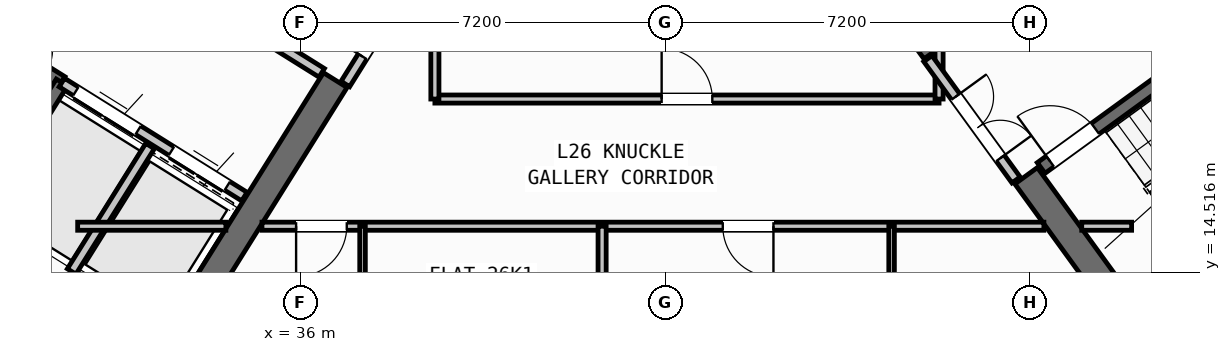
"""IFC4 building model, lengths in metres.
Left out: names, types, materials, properties, quantities, classifications, styles, units other than length and angle.
Written with IfcOpenShell. Run it as: python <this file> out.ifc"""

import sys

from ifc_helpers import new_model, si_unit, direction, frame, frame_2d, origin, place, context, subcontext, project, spatial, rectangle, extrude, source, transform, mapped, element, fill, save


model = new_model("IFC4")
c1 = context("Model", 3, precision=1e-05, world=origin(), true_north=direction((0.0, 1.0)))
c2 = subcontext(c1, "Body", "Model", "MODEL_VIEW")
j1 = project(units=[si_unit("LENGTHUNIT", "METRE"), si_unit("PLANEANGLEUNIT", "RADIAN")], contexts=[c1])
p1 = place(None, origin())
s1 = spatial("IfcSite", under=j1, at=p1, CompositionType="ELEMENT")
p2 = place(p1, origin())
s2 = spatial("IfcBuilding", under=s1, at=p2, CompositionType="ELEMENT")
p3 = place(p2, frame((0.0, 0.0, 105.3)))
s3 = spatial("IfcBuildingStorey", under=s2, at=p3, CompositionType="ELEMENT", Elevation=105.3)
p4 = place(p3, frame((33.366, 12.477, 0.0), z_axis=(0.0, 0.0, 1.0), x_axis=(-0.848047359947, 0.529920442413, 0.0)))
e1 = element("IfcWall", 1, at=p4, inside=s3, PredefinedType="SHEAR", context=c2, shape_type="SweptSolid", body=[
    extrude(rectangle(XDim=13.14, YDim=0.55, at=frame_2d((6.57, 0.0))), origin(), (0.0, 0.0, 1.0), 3.35),
])
p5 = place(p3, frame((36.683, 18.304, 0.0), z_axis=(0.0, 0.0, 1.0), x_axis=(-0.529896466841, -0.848062341122, 0.0)))
e2 = element("IfcWall", 2, at=p5, inside=s3, PredefinedType="SHEAR", context=c2, shape_type="SweptSolid", body=[
    extrude(rectangle(XDim=6.425, YDim=0.55, at=frame_2d((3.212, 0.0))), origin(), (0.0, 0.0, 1.0), 3.35),
])
p6 = place(p3, frame((52.359, 13.14, 0.0), z_axis=(0.0, 0.0, 1.0), x_axis=(0.809014896919, 0.587788139183, 0.0)))
e3 = element("IfcWall", 3, at=p6, inside=s3, PredefinedType="SHEAR", context=c2, shape_type="SweptSolid", body=[
    extrude(rectangle(XDim=12.34, YDim=0.55, at=frame_2d((6.17, 0.0))), origin(), (0.0, 0.0, 1.0), 3.35),
])
p7 = place(p3, frame((52.42, 13.524, 0.0), z_axis=(0.0, 0.0, 1.0), x_axis=(-0.587802113096, 0.809004744015, 0.0)))
e4 = element("IfcWall", 4, at=p7, inside=s3, PredefinedType="SHEAR", context=c2, shape_type="SweptSolid", body=[
    extrude(rectangle(XDim=3.575, YDim=0.55, at=frame_2d((1.788, 0.0))), origin(), (0.0, 0.0, 1.0), 3.35),
])
p8 = place(p3, frame((48.526, 18.884, 0.0), z_axis=(0.0, 0.0, 1.0), x_axis=(-0.587764933797, 0.809031756236, 0.0)))
e5 = element("IfcWall", 5, at=p8, inside=s3, PredefinedType="SHEAR", context=c2, shape_type="SweptSolid", body=[
    extrude(rectangle(XDim=6.425, YDim=0.55, at=frame_2d((3.212, 0.0))), origin(), (0.0, 0.0, 1.0), 3.35),
])
p9 = place(p3, frame((31.76, 12.183, 0.0), z_axis=(0.0, 0.0, 1.0), x_axis=(-0.848047074256, 0.529920899612, 0.0)))
e6 = element("IfcWall", 6, at=p9, inside=s3, PredefinedType="STANDARD", context=c2, shape_type="SweptSolid", body=[
    extrude(rectangle(XDim=30.652, YDim=0.32, at=frame_2d((15.326, 0.0))), origin(), (0.0, 0.0, 1.0), 3.35),
])
p10 = place(p9, frame((15.153, 0.0, 0.0)))
e7 = element("IfcOpeningElement", 7, at=p10, cuts=e6, PredefinedType="OPENING", context=c2, shape_type="SweptSolid", body=[
    extrude(rectangle(XDim=1.2, YDim=2.15, at=frame_2d((0.6, 1.075))), frame((0.0, 0.17, 0.0), z_axis=(0.0, -1.0, 0.0), x_axis=(1.0, 0.0, 0.0)), (0.0, 0.0, 1.0), 0.34),
])
p11 = place(p9, frame((2.002, 0.0, 0.8)))
e8 = element("IfcOpeningElement", 8, at=p11, cuts=e6, PredefinedType="OPENING", context=c2, shape_type="SweptSolid", body=[
    extrude(rectangle(XDim=2.1, YDim=1.55, at=frame_2d((1.05, 0.775))), frame((0.0, 0.17, 0.0), z_axis=(0.0, -1.0, 0.0), x_axis=(1.0, 0.0, 0.0)), (0.0, 0.0, 1.0), 0.34),
])
p12 = place(p9, frame((7.206, 0.0, 0.8)))
e9 = element("IfcOpeningElement", 9, at=p12, cuts=e6, PredefinedType="OPENING", context=c2, shape_type="SweptSolid", body=[
    extrude(rectangle(XDim=2.1, YDim=1.55, at=frame_2d((1.05, 0.775))), frame((0.0, 0.17, 0.0), z_axis=(0.0, -1.0, 0.0), x_axis=(1.0, 0.0, 0.0)), (0.0, 0.0, 1.0), 0.34),
])
p13 = place(p9, frame((12.648, 0.0, 1.0)))
e10 = element("IfcOpeningElement", 10, at=p13, cuts=e6, PredefinedType="OPENING", context=c2, shape_type="SweptSolid", body=[
    extrude(rectangle(XDim=0.9, YDim=1.25, at=frame_2d((0.45, 0.625))), frame((0.0, 0.17, 0.0), z_axis=(0.0, -1.0, 0.0), x_axis=(1.0, 0.0, 0.0)), (0.0, 0.0, 1.0), 0.34),
])
p14 = place(p9, frame((20.628, 0.0, 0.95)))
e11 = element("IfcOpeningElement", 11, at=p14, cuts=e6, PredefinedType="OPENING", context=c2, shape_type="SweptSolid", body=[
    extrude(rectangle(XDim=1.2, YDim=1.4, at=frame_2d((0.6, 0.7))), frame((0.0, 0.17, 0.0), z_axis=(0.0, -1.0, 0.0), x_axis=(1.0, 0.0, 0.0)), (0.0, 0.0, 1.0), 0.34),
])
p15 = place(p9, frame((26.008, 0.0, 1.0)))
e12 = element("IfcOpeningElement", 12, at=p15, cuts=e6, PredefinedType="OPENING", context=c2, shape_type="SweptSolid", body=[
    extrude(rectangle(XDim=0.9, YDim=1.25, at=frame_2d((0.45, 0.625))), frame((0.0, 0.17, 0.0), z_axis=(0.0, -1.0, 0.0), x_axis=(1.0, 0.0, 0.0)), (0.0, 0.0, 1.0), 0.34),
])
p16 = place(p9, frame((28.408, 0.0, 1.0)))
e13 = element("IfcOpeningElement", 13, at=p16, cuts=e6, PredefinedType="OPENING", context=c2, shape_type="SweptSolid", body=[
    extrude(rectangle(XDim=0.9, YDim=1.25, at=frame_2d((0.45, 0.625))), frame((0.0, 0.17, 0.0), z_axis=(0.0, -1.0, 0.0), x_axis=(1.0, 0.0, 0.0)), (0.0, 0.0, 1.0), 0.34),
])
p17 = place(p3, frame((31.28, 18.261, 0.0), z_axis=(0.0, 0.0, 1.0), x_axis=(-0.848051618787, 0.529913626805, 0.0)))
e14 = element("IfcWall", 14, at=p17, inside=s3, PredefinedType="SHEAR", context=c2, shape_type="SweptSolid", body=[
    extrude(rectangle(XDim=7.46, YDim=0.26, at=frame_2d((3.73, 0.0))), origin(), (0.0, 0.0, 1.0), 3.35),
])
p18 = place(p17, frame((0.36, 0.0, 0.0)))
e15 = element("IfcOpeningElement", 15, at=p18, cuts=e14, PredefinedType="OPENING", context=c2, shape_type="SweptSolid", body=[
    extrude(rectangle(XDim=0.86, YDim=2.05, at=frame_2d((0.43, 1.025))), frame((0.0, 0.14, 0.0), z_axis=(0.0, -1.0, 0.0), x_axis=(1.0, 0.0, 0.0)), (0.0, 0.0, 1.0), 0.28),
])
p19 = place(p3, frame((31.288, 18.256, 0.0), z_axis=(0.0, 0.0, 1.0), x_axis=(-0.529943379326, -0.848033026897, 0.0)))
e16 = element("IfcWall", 16, at=p19, inside=s3, PredefinedType="SHEAR", context=c2, shape_type="SweptSolid", body=[
    extrude(rectangle(XDim=3.16, YDim=0.26, at=frame_2d((1.58, 0.0))), origin(), (0.0, 0.0, 1.0), 3.35),
])
p20 = place(p3, frame((34.891, 16.005, 0.0), z_axis=(0.0, 0.0, 1.0), x_axis=(-0.848062873452, 0.529895614884, 0.0)))
e17 = element("IfcWall", 17, at=p20, inside=s3, PredefinedType="STANDARD", context=c2, shape_type="SweptSolid", body=[
    extrude(rectangle(XDim=4.248, YDim=0.2, at=frame_2d((2.124, 0.0))), origin(), (0.0, 0.0, 1.0), 3.34),
])
p21 = place(p20, frame((0.398, 0.0, 0.0)))
e18 = element("IfcOpeningElement", 18, at=p21, cuts=e17, PredefinedType="OPENING", context=c2, shape_type="SweptSolid", body=[
    extrude(rectangle(XDim=1.3, YDim=2.2, at=frame_2d((0.65, 1.1))), frame((0.0, 0.11, 0.0), z_axis=(0.0, -1.0, 0.0), x_axis=(1.0, 0.0, 0.0)), (0.0, 0.0, 1.0), 0.22),
])
p22 = place(p20, frame((2.473, 0.0, 0.0)))
e19 = element("IfcOpeningElement", 19, at=p22, cuts=e17, PredefinedType="OPENING", context=c2, shape_type="SweptSolid", body=[
    extrude(rectangle(XDim=1.45, YDim=2.25, at=frame_2d((0.725, 1.125))), frame((0.0, 0.11, 0.0), z_axis=(0.0, -1.0, 0.0), x_axis=(1.0, 0.0, 0.0)), (0.0, 0.0, 1.0), 0.22),
])
p23 = place(p3, frame((36.417, 18.447, 0.0), z_axis=(0.0, 0.0, 1.0), x_axis=(-0.848064879198, 0.529892404805, 0.0)))
e20 = element("IfcWall", 20, at=p23, inside=s3, PredefinedType="STANDARD", context=c2, shape_type="SweptSolid", body=[
    extrude(rectangle(XDim=5.768, YDim=0.2, at=frame_2d((2.884, 0.0))), origin(), (0.0, 0.0, 1.0), 3.34),
])
p24 = place(p23, frame((2.548, 0.0, 0.0)))
e21 = element("IfcOpeningElement", 21, at=p24, cuts=e20, PredefinedType="OPENING", context=c2, shape_type="SweptSolid", body=[
    extrude(rectangle(XDim=1.15, YDim=2.1, at=frame_2d((0.575, 1.05))), frame((0.0, 0.11, 0.0), z_axis=(0.0, -1.0, 0.0), x_axis=(1.0, 0.0, 0.0)), (0.0, 0.0, 1.0), 0.22),
])
p25 = place(p3, frame((33.029, 17.003, 0.0), z_axis=(0.0, 0.0, 1.0), x_axis=(-0.529916267533, -0.848049968695, 0.0)))
e22 = element("IfcWall", 22, at=p25, inside=s3, PredefinedType="STANDARD", context=c2, shape_type="SweptSolid", body=[
    extrude(rectangle(XDim=2.92, YDim=0.2, at=frame_2d((1.46, 0.0))), origin(), (0.0, 0.0, 1.0), 3.34),
])
p26 = place(p3, frame((52.472, 14.013, 0.0), z_axis=(0.0, 0.0, 1.0), x_axis=(0.809028366311, 0.587769599847, 0.0)))
e23 = element("IfcWall", 23, at=p26, inside=s3, PredefinedType="SHEAR", context=c2, shape_type="SweptSolid", body=[
    extrude(rectangle(XDim=7.33, YDim=0.26, at=frame_2d((3.665, 0.0))), origin(), (0.0, 0.0, 1.0), 3.35),
])
p27 = place(p3, frame((50.615, 16.57, 0.0), z_axis=(0.0, 0.0, 1.0), x_axis=(0.809028366311, 0.587769599847, 0.0)))
e24 = element("IfcWall", 24, at=p27, inside=s3, PredefinedType="SHEAR", context=c2, shape_type="SweptSolid", body=[
    extrude(rectangle(XDim=7.33, YDim=0.26, at=frame_2d((3.665, 0.0))), origin(), (0.0, 0.0, 1.0), 3.35),
])
p28 = place(p27, frame((0.22, 0.0, 0.0)))
e25 = element("IfcOpeningElement", 25, at=p28, cuts=e24, PredefinedType="OPENING", context=c2, shape_type="SweptSolid", body=[
    extrude(rectangle(XDim=1.1, YDim=2.1, at=frame_2d((0.55, 1.05))), frame((0.0, 0.14, 0.0), z_axis=(0.0, -1.0, 0.0), x_axis=(1.0, 0.0, 0.0)), (0.0, 0.0, 1.0), 0.28),
])
p29 = place(p3, frame((38.451, 20.737, 0.0), z_axis=(0.0, 0.0, 1.0), x_axis=(-0.529924799939, -0.848044637038, 0.0)))
e26 = element("IfcWall", 26, at=p29, inside=s3, PredefinedType="STANDARD", context=c2, shape_type="SweptSolid", body=[
    extrude(rectangle(XDim=2.96, YDim=0.2, at=frame_2d((1.48, 0.0))), origin(), (0.0, 0.0, 1.0), 3.34),
])
p30 = place(p29, frame((1.46, 0.0, 0.0)))
e27 = element("IfcOpeningElement", 27, at=p30, cuts=e26, PredefinedType="OPENING", context=c2, shape_type="SweptSolid", body=[
    extrude(rectangle(XDim=0.86, YDim=2.05, at=frame_2d((0.43, 1.025))), frame((0.0, 0.11, 0.0), z_axis=(0.0, -1.0, 0.0), x_axis=(1.0, 0.0, 0.0)), (0.0, 0.0, 1.0), 0.22),
])
p31 = place(p3, frame((31.6, 15.42, 0.0), z_axis=(0.0, 0.0, 1.0), x_axis=(1.0, 0.0, 0.0)))
e28 = element("IfcWall", 28, at=p31, inside=s3, PredefinedType="PARTITIONING", context=c2, shape_type="SweptSolid", body=[
    extrude(rectangle(XDim=2.925, YDim=0.16, at=frame_2d((1.462, 0.0))), origin(), (0.0, 0.0, 1.0), 3.34),
])
p32 = place(p3, frame((35.237, 15.42, 0.0), z_axis=(0.0, 0.0, 1.0), x_axis=(1.0, 0.0, 0.0)))
e29 = element("IfcWall", 29, at=p32, inside=s3, PredefinedType="PARTITIONING", context=c2, shape_type="SweptSolid", body=[
    extrude(rectangle(XDim=15.432, YDim=0.16, at=frame_2d((7.716, 0.0))), origin(), (0.0, 0.0, 1.0), 3.34),
])
p33 = place(p32, frame((0.674, 0.0, 0.0)))
e30 = element("IfcOpeningElement", 30, at=p33, cuts=e29, PredefinedType="OPENING", context=c2, shape_type="SweptSolid", body=[
    extrude(rectangle(XDim=1.0, YDim=2.1, at=frame_2d((0.5, 1.05))), frame((0.0, 0.09, 0.0), z_axis=(0.0, -1.0, 0.0), x_axis=(1.0, 0.0, 0.0)), (0.0, 0.0, 1.0), 0.18),
])
p34 = place(p32, frame((9.094, 0.0, 0.0)))
e31 = element("IfcOpeningElement", 31, at=p34, cuts=e29, PredefinedType="OPENING", context=c2, shape_type="SweptSolid", body=[
    extrude(rectangle(XDim=1.0, YDim=2.1, at=frame_2d((0.5, 1.05))), frame((0.0, 0.09, 0.0), z_axis=(0.0, -1.0, 0.0), x_axis=(1.0, 0.0, 0.0)), (0.0, 0.0, 1.0), 0.18),
])
p35 = place(p3, frame((51.416, 15.42, 0.0), z_axis=(0.0, 0.0, 1.0), x_axis=(1.0, 0.0, 0.0)))
e32 = element("IfcWall", 32, at=p35, inside=s3, PredefinedType="PARTITIONING", context=c2, shape_type="SweptSolid", body=[
    extrude(rectangle(XDim=0.984, YDim=0.16, at=frame_2d((0.492, 0.0))), origin(), (0.0, 0.0, 1.0), 3.34),
])
p36 = place(p3, frame((38.65, 17.93, 0.0), z_axis=(0.0, 0.0, 1.0), x_axis=(1.0, 0.0, 0.0)))
e33 = element("IfcWall", 33, at=p36, inside=s3, PredefinedType="PARTITIONING", context=c2, shape_type="SweptSolid", body=[
    extrude(rectangle(XDim=9.95, YDim=0.16, at=frame_2d((4.975, 0.0))), origin(), (0.0, 0.0, 1.0), 3.34),
])
p37 = place(p36, frame((4.475, 0.0, 0.0)))
e34 = element("IfcOpeningElement", 34, at=p37, cuts=e33, PredefinedType="OPENING", context=c2, shape_type="SweptSolid", body=[
    extrude(rectangle(XDim=1.0, YDim=2.1, at=frame_2d((0.5, 1.05))), frame((0.0, 0.09, 0.0), z_axis=(0.0, -1.0, 0.0), x_axis=(1.0, 0.0, 0.0)), (0.0, 0.0, 1.0), 0.18),
])
p38 = place(p3, frame((38.65, 17.93, 0.0), z_axis=(0.0, 0.0, 1.0), x_axis=(0.0, 1.0, 0.0)))
e35 = element("IfcWall", 35, at=p38, inside=s3, PredefinedType="PARTITIONING", context=c2, shape_type="SweptSolid", body=[
    extrude(rectangle(XDim=2.951, YDim=0.16, at=frame_2d((1.476, 0.0))), origin(), (0.0, 0.0, 1.0), 3.34),
])
p39 = place(p3, frame((48.6, 17.93, 0.0), z_axis=(0.0, 0.0, 1.0), x_axis=(0.0, 1.0, 0.0)))
e36 = element("IfcWall", 36, at=p39, inside=s3, PredefinedType="PARTITIONING", context=c2, shape_type="SweptSolid", body=[
    extrude(rectangle(XDim=0.993, YDim=0.16, at=frame_2d((0.496, 0.0))), origin(), (0.0, 0.0, 1.0), 3.34),
])
p40 = place(p3, frame((50.119, 16.333, 0.0), z_axis=(0.0, 0.0, 1.0), x_axis=(-0.587749856981, 0.809042709391, 0.0)))
e37 = element("IfcWall", 37, at=p40, inside=s3, PredefinedType="STANDARD", context=c2, shape_type="SweptSolid", body=[
    extrude(rectangle(XDim=2.96, YDim=0.2, at=frame_2d((1.48, 0.0))), origin(), (0.0, 0.0, 1.0), 3.34),
])
p41 = place(p40, frame((0.53, 0.0, 0.0)))
e38 = element("IfcOpeningElement", 38, at=p41, cuts=e37, PredefinedType="OPENING", context=c2, shape_type="SweptSolid", body=[
    extrude(rectangle(XDim=1.5, YDim=2.15, at=frame_2d((0.75, 1.075))), frame((0.0, 0.11, 0.0), z_axis=(0.0, -1.0, 0.0), x_axis=(1.0, 0.0, 0.0)), (0.0, 0.0, 1.0), 0.22),
])
p42 = place(p3, frame((41.95, 1.96, 0.0), z_axis=(0.0, 0.0, 1.0), x_axis=(0.0, 1.0, 0.0)))
e39 = element("IfcWall", 39, at=p42, inside=s3, PredefinedType="PARTITIONING", context=c2, shape_type="SweptSolid", body=[
    extrude(rectangle(XDim=13.46, YDim=0.16, at=frame_2d((6.73, 0.0))), origin(), (0.0, 0.0, 1.0), 3.34),
])
p43 = place(p3, frame((37.222, 1.96, 0.0), z_axis=(0.0, 0.0, 1.0), x_axis=(0.0, 1.0, 0.0)))
e40 = element("IfcWall", 40, at=p43, inside=s3, PredefinedType="PARTITIONING", context=c2, shape_type="SweptSolid", body=[
    extrude(rectangle(XDim=13.46, YDim=0.11, at=frame_2d((6.73, 0.0))), origin(), (0.0, 0.0, 1.0), 3.34),
])
p44 = place(p43, frame((5.2, 0.0, 0.0)))
e41 = element("IfcOpeningElement", 41, at=p44, cuts=e40, PredefinedType="OPENING", context=c2, shape_type="SweptSolid", body=[
    extrude(rectangle(XDim=0.92, YDim=2.08, at=frame_2d((0.46, 1.04))), frame((0.0, 0.065, 0.0), z_axis=(0.0, -1.0, 0.0), x_axis=(1.0, 0.0, 0.0)), (0.0, 0.0, 1.0), 0.13),
])
p45 = place(p43, frame((10.67, 0.0, 0.0)))
e42 = element("IfcOpeningElement", 42, at=p45, cuts=e40, PredefinedType="OPENING", context=c2, shape_type="SweptSolid", body=[
    extrude(rectangle(XDim=0.88, YDim=2.08, at=frame_2d((0.44, 1.04))), frame((0.0, 0.065, 0.0), z_axis=(0.0, -1.0, 0.0), x_axis=(1.0, 0.0, 0.0)), (0.0, 0.0, 1.0), 0.13),
])
p46 = place(p3, frame((47.663, 1.96, 0.0), z_axis=(0.0, 0.0, 1.0), x_axis=(0.0, 1.0, 0.0)))
e43 = element("IfcWall", 43, at=p46, inside=s3, PredefinedType="PARTITIONING", context=c2, shape_type="SweptSolid", body=[
    extrude(rectangle(XDim=13.46, YDim=0.11, at=frame_2d((6.73, 0.0))), origin(), (0.0, 0.0, 1.0), 3.34),
])
p47 = place(p46, frame((6.3, 0.0, 0.0)))
e44 = element("IfcOpeningElement", 44, at=p47, cuts=e43, PredefinedType="OPENING", context=c2, shape_type="SweptSolid", body=[
    extrude(rectangle(XDim=0.92, YDim=2.08, at=frame_2d((0.46, 1.04))), frame((0.0, 0.065, 0.0), z_axis=(0.0, -1.0, 0.0), x_axis=(1.0, 0.0, 0.0)), (0.0, 0.0, 1.0), 0.13),
])
p48 = place(p46, frame((11.32, 0.0, 0.0)))
e45 = element("IfcOpeningElement", 45, at=p48, cuts=e43, PredefinedType="OPENING", context=c2, shape_type="SweptSolid", body=[
    extrude(rectangle(XDim=0.88, YDim=2.08, at=frame_2d((0.44, 1.04))), frame((0.0, 0.065, 0.0), z_axis=(0.0, -1.0, 0.0), x_axis=(1.0, 0.0, 0.0)), (0.0, 0.0, 1.0), 0.13),
])
m1 = source(origin(), c2, "Body", "SweptSolid", [
    extrude(rectangle(XDim=1.3, YDim=2.2, at=frame_2d((0.65, 1.1))), frame((0.0, 0.025, 0.0), z_axis=(0.0, -1.0, 0.0), x_axis=(1.0, 0.0, 0.0)), (0.0, 0.0, 1.0), 0.05),
])
p49 = place(p21, origin())
e46 = element("IfcDoor", 46, at=p49, inside=s3, OperationType="DOUBLE_DOOR_SLIDING", PredefinedType="DOOR", context=c2, shape_type="MappedRepresentation", body=[
    mapped(m1, transform((0.0, 0.0, 0.0), scale=1.0)),
])
fill(e18, e46)
m2 = source(origin(), c2, "Body", "SweptSolid", [
    extrude(rectangle(XDim=1.45, YDim=2.25, at=frame_2d((0.725, 1.125))), frame((0.0, 0.025, 0.0), z_axis=(0.0, -1.0, 0.0), x_axis=(1.0, 0.0, 0.0)), (0.0, 0.0, 1.0), 0.05),
])
p50 = place(p22, origin())
e47 = element("IfcDoor", 47, at=p50, inside=s3, OperationType="DOUBLE_DOOR_SLIDING", PredefinedType="DOOR", context=c2, shape_type="MappedRepresentation", body=[
    mapped(m2, transform((0.0, 0.0, 0.0), scale=1.0)),
])
fill(e19, e47)
m3 = source(origin(), c2, "Body", "SweptSolid", [
    extrude(rectangle(XDim=1.1, YDim=2.1, at=frame_2d((0.55, 1.05))), frame((0.0, 0.025, 0.0), z_axis=(0.0, -1.0, 0.0), x_axis=(1.0, 0.0, 0.0)), (0.0, 0.0, 1.0), 0.05),
])
p51 = place(p28, origin())
e48 = element("IfcDoor", 48, at=p51, inside=s3, OperationType="SINGLE_SWING_LEFT", PredefinedType="DOOR", context=c2, shape_type="MappedRepresentation", body=[
    mapped(m3, transform((0.0, 0.0, 0.0), scale=1.0)),
])
fill(e25, e48)
m4 = source(origin(), c2, "Body", "SweptSolid", [
    extrude(rectangle(XDim=1.0, YDim=2.1, at=frame_2d((0.5, 1.05))), frame((0.0, 0.025, 0.0), z_axis=(0.0, -1.0, 0.0), x_axis=(1.0, 0.0, 0.0)), (0.0, 0.0, 1.0), 0.05),
])
p52 = place(p37, origin())
e49 = element("IfcDoor", 49, at=p52, inside=s3, OperationType="SINGLE_SWING_LEFT", PredefinedType="DOOR", context=c2, shape_type="MappedRepresentation", body=[
    mapped(m4, transform((0.0, 0.0, 0.0), scale=1.0)),
])
fill(e34, e49)
m5 = source(origin(), c2, "Body", "SweptSolid", [
    extrude(rectangle(XDim=0.86, YDim=2.05, at=frame_2d((0.43, 1.025))), frame((0.0, 0.025, 0.0), z_axis=(0.0, -1.0, 0.0), x_axis=(1.0, 0.0, 0.0)), (0.0, 0.0, 1.0), 0.05),
])
p53 = place(p30, frame((0.86, 0.0, 0.0), z_axis=(0.0, 0.0, 1.0), x_axis=(-1.0, 0.0, 0.0)))
e50 = element("IfcDoor", 50, at=p53, inside=s3, OperationType="SINGLE_SWING_LEFT", PredefinedType="DOOR", context=c2, shape_type="MappedRepresentation", body=[
    mapped(m5, transform((0.0, 0.0, 0.0), scale=1.0)),
])
fill(e27, e50)
m6 = source(origin(), c2, "Body", "SweptSolid", [
    extrude(rectangle(XDim=1.5, YDim=2.15, at=frame_2d((0.75, 1.075))), frame((0.0, 0.025, 0.0), z_axis=(0.0, -1.0, 0.0), x_axis=(1.0, 0.0, 0.0)), (0.0, 0.0, 1.0), 0.05),
])
p54 = place(p41, frame((1.5, 0.0, 0.0), z_axis=(0.0, 0.0, 1.0), x_axis=(-1.0, 0.0, 0.0)))
e51 = element("IfcDoor", 51, at=p54, inside=s3, OperationType="DOUBLE_DOOR_SINGLE_SWING", PredefinedType="DOOR", context=c2, shape_type="MappedRepresentation", body=[
    mapped(m6, transform((0.0, 0.0, 0.0), scale=1.0)),
])
fill(e38, e51)
p55 = place(p33, frame((1.0, 0.0, 0.0), z_axis=(0.0, 0.0, 1.0), x_axis=(-1.0, 0.0, 0.0)))
e52 = element("IfcDoor", 52, at=p55, inside=s3, OperationType="SINGLE_SWING_RIGHT", PredefinedType="DOOR", context=c2, shape_type="MappedRepresentation", body=[
    mapped(m4, transform((0.0, 0.0, 0.0), scale=1.0)),
])
fill(e30, e52)
p56 = place(p34, frame((1.0, 0.0, 0.0), z_axis=(0.0, 0.0, 1.0), x_axis=(-1.0, 0.0, 0.0)))
e53 = element("IfcDoor", 53, at=p56, inside=s3, OperationType="SINGLE_SWING_LEFT", PredefinedType="DOOR", context=c2, shape_type="MappedRepresentation", body=[
    mapped(m4, transform((0.0, 0.0, 0.0), scale=1.0)),
])
fill(e31, e53)
save(model, sys.argv[1])
